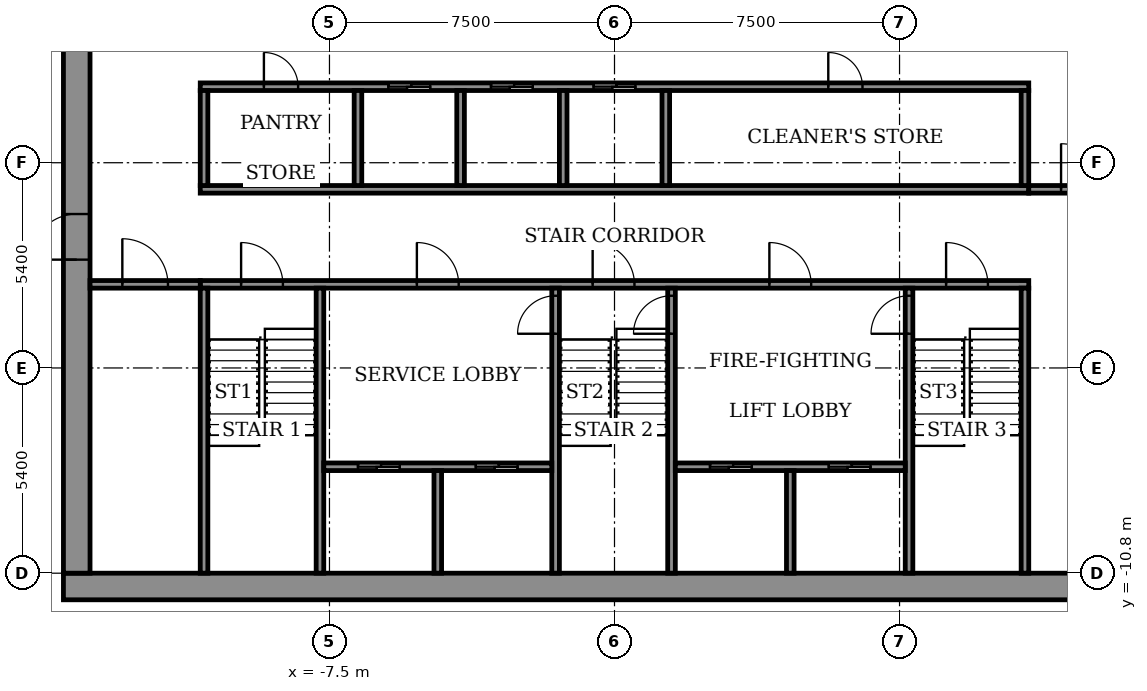
"""IFC4 building model, lengths in metres.
Left out: names, types, materials, properties, quantities, classifications, styles, units other than length and angle.
Written with IfcOpenShell. Run it as: python <this file> out.ifc"""

import sys

from ifc_helpers import new_model, si_unit, direction, frame, frame_2d, origin, place, context, subcontext, project, spatial, rectangle, extrude, element, fill, save


model = new_model("IFC4")
c1 = context("Model", 3, precision=1e-05, world=origin(), true_north=direction((0.0, 1.0)))
c2 = subcontext(c1, "Body", "Model", "MODEL_VIEW")
j1 = project(units=[si_unit("LENGTHUNIT", "METRE"), si_unit("PLANEANGLEUNIT", "RADIAN")], contexts=[c1])
p1 = place(None, origin())
s1 = spatial("IfcSite", under=j1, at=p1, CompositionType="ELEMENT")
p2 = place(p1, origin())
s2 = spatial("IfcBuilding", under=s1, at=p2, CompositionType="ELEMENT")
p3 = place(p2, frame((0.0, 0.0, 287.1)))
s3 = spatial("IfcBuildingStorey", under=s2, at=p3, CompositionType="ELEMENT", Elevation=287.1)
p4 = place(p3, frame((-14.5, -11.15, 0.0), z_axis=(0.0, 0.0, 1.0), x_axis=(1.0, 0.0, 0.0)))
e1 = element("IfcWall", 1, at=p4, inside=s3, PredefinedType="SHEAR", context=c2, shape_type="SweptSolid", body=[
    extrude(rectangle(XDim=29.0, YDim=0.7, at=frame_2d((14.5, 0.0))), origin(), (0.0, 0.0, 1.0), 3.6),
])
p5 = place(p3, frame((-14.15, -10.8, 0.0), z_axis=(0.0, 0.0, 1.0), x_axis=(0.0, 1.0, 0.0)))
e2 = element("IfcWall", 2, at=p5, inside=s3, PredefinedType="SHEAR", context=c2, shape_type="SweptSolid", body=[
    extrude(rectangle(XDim=21.6, YDim=0.7, at=frame_2d((10.8, 0.0))), origin(), (0.0, 0.0, 1.0), 3.6),
])
p6 = place(p5, frame((8.25, 0.0, 0.0)))
e3 = element("IfcOpeningElement", 3, at=p6, cuts=e2, PredefinedType="OPENING", context=c2, shape_type="SweptSolid", body=[
    extrude(rectangle(XDim=1.2, YDim=2.1, at=frame_2d((0.6, 1.05))), frame((0.0, 0.36, 0.0), z_axis=(0.0, -1.0, 0.0), x_axis=(1.0, 0.0, 0.0)), (0.0, 0.0, 1.0), 0.72),
])
p7 = place(p5, frame((15.25, 0.0, 0.0)))
e4 = element("IfcOpeningElement", 4, at=p7, cuts=e2, PredefinedType="OPENING", context=c2, shape_type="SweptSolid", body=[
    extrude(rectangle(XDim=1.2, YDim=2.1, at=frame_2d((0.6, 1.05))), frame((0.0, 0.36, 0.0), z_axis=(0.0, -1.0, 0.0), x_axis=(1.0, 0.0, 0.0)), (0.0, 0.0, 1.0), 0.72),
])
p8 = place(p3, frame((-10.9, -3.2, 0.0), z_axis=(0.0, 0.0, 1.0), x_axis=(1.0, 0.0, 0.0)))
e5 = element("IfcWall", 5, at=p8, inside=s3, PredefinedType="SHEAR", context=c2, shape_type="SweptSolid", body=[
    extrude(rectangle(XDim=21.8, YDim=0.2, at=frame_2d((10.9, 0.0))), origin(), (0.0, 0.0, 1.0), 3.05),
])
p9 = place(p8, frame((1.075, 0.0, 0.0)))
e6 = element("IfcOpeningElement", 6, at=p9, cuts=e5, PredefinedType="OPENING", context=c2, shape_type="SweptSolid", body=[
    extrude(rectangle(XDim=1.1, YDim=2.1, at=frame_2d((0.55, 1.05))), frame((0.0, 0.11, 0.0), z_axis=(0.0, -1.0, 0.0), x_axis=(1.0, 0.0, 0.0)), (0.0, 0.0, 1.0), 0.22),
])
p10 = place(p8, frame((10.325, 0.0, 0.0)))
e7 = element("IfcOpeningElement", 7, at=p10, cuts=e5, PredefinedType="OPENING", context=c2, shape_type="SweptSolid", body=[
    extrude(rectangle(XDim=1.1, YDim=2.1, at=frame_2d((0.55, 1.05))), frame((0.0, 0.11, 0.0), z_axis=(0.0, -1.0, 0.0), x_axis=(1.0, 0.0, 0.0)), (0.0, 0.0, 1.0), 0.22),
])
p11 = place(p8, frame((19.625, 0.0, 0.0)))
e8 = element("IfcOpeningElement", 8, at=p11, cuts=e5, PredefinedType="OPENING", context=c2, shape_type="SweptSolid", body=[
    extrude(rectangle(XDim=1.1, YDim=2.1, at=frame_2d((0.55, 1.05))), frame((0.0, 0.11, 0.0), z_axis=(0.0, -1.0, 0.0), x_axis=(1.0, 0.0, 0.0)), (0.0, 0.0, 1.0), 0.22),
])
p12 = place(p8, frame((5.7, 0.0, 0.0)))
e9 = element("IfcOpeningElement", 9, at=p12, cuts=e5, PredefinedType="OPENING", context=c2, shape_type="SweptSolid", body=[
    extrude(rectangle(XDim=1.1, YDim=2.1, at=frame_2d((0.55, 1.05))), frame((0.0, 0.11, 0.0), z_axis=(0.0, -1.0, 0.0), x_axis=(1.0, 0.0, 0.0)), (0.0, 0.0, 1.0), 0.22),
])
p13 = place(p8, frame((14.975, 0.0, 0.0)))
e10 = element("IfcOpeningElement", 10, at=p13, cuts=e5, PredefinedType="OPENING", context=c2, shape_type="SweptSolid", body=[
    extrude(rectangle(XDim=1.1, YDim=2.1, at=frame_2d((0.55, 1.05))), frame((0.0, 0.11, 0.0), z_axis=(0.0, -1.0, 0.0), x_axis=(1.0, 0.0, 0.0)), (0.0, 0.0, 1.0), 0.22),
])
p14 = place(p3, frame((-10.9, -0.7, 0.0), z_axis=(0.0, 0.0, 1.0), x_axis=(1.0, 0.0, 0.0)))
e11 = element("IfcWall", 11, at=p14, inside=s3, PredefinedType="SHEAR", context=c2, shape_type="SweptSolid", body=[
    extrude(rectangle(XDim=21.8, YDim=0.2, at=frame_2d((10.9, 0.0))), origin(), (0.0, 0.0, 1.0), 3.05),
])
p15 = place(p3, frame((-10.9, 2.0, 0.0), z_axis=(0.0, 0.0, 1.0), x_axis=(1.0, 0.0, 0.0)))
e12 = element("IfcWall", 12, at=p15, inside=s3, PredefinedType="SHEAR", context=c2, shape_type="SweptSolid", body=[
    extrude(rectangle(XDim=21.8, YDim=0.2, at=frame_2d((10.9, 0.0))), origin(), (0.0, 0.0, 1.0), 3.05),
])
p16 = place(p15, frame((4.95, 0.0, 0.0)))
e13 = element("IfcOpeningElement", 13, at=p16, cuts=e12, PredefinedType="OPENING", context=c2, shape_type="SweptSolid", body=[
    extrude(rectangle(XDim=1.1, YDim=2.1, at=frame_2d((0.55, 1.05))), frame((0.0, 0.11, 0.0), z_axis=(0.0, -1.0, 0.0), x_axis=(1.0, 0.0, 0.0)), (0.0, 0.0, 1.0), 0.22),
])
p17 = place(p15, frame((7.65, 0.0, 0.0)))
e14 = element("IfcOpeningElement", 14, at=p17, cuts=e12, PredefinedType="OPENING", context=c2, shape_type="SweptSolid", body=[
    extrude(rectangle(XDim=1.1, YDim=2.1, at=frame_2d((0.55, 1.05))), frame((0.0, 0.11, 0.0), z_axis=(0.0, -1.0, 0.0), x_axis=(1.0, 0.0, 0.0)), (0.0, 0.0, 1.0), 0.22),
])
p18 = place(p15, frame((10.35, 0.0, 0.0)))
e15 = element("IfcOpeningElement", 15, at=p18, cuts=e12, PredefinedType="OPENING", context=c2, shape_type="SweptSolid", body=[
    extrude(rectangle(XDim=1.1, YDim=2.1, at=frame_2d((0.55, 1.05))), frame((0.0, 0.11, 0.0), z_axis=(0.0, -1.0, 0.0), x_axis=(1.0, 0.0, 0.0)), (0.0, 0.0, 1.0), 0.22),
])
p19 = place(p15, frame((1.675, 0.0, 0.0)))
e16 = element("IfcOpeningElement", 16, at=p19, cuts=e12, PredefinedType="OPENING", context=c2, shape_type="SweptSolid", body=[
    extrude(rectangle(XDim=0.9, YDim=2.1, at=frame_2d((0.45, 1.05))), frame((0.0, 0.11, 0.0), z_axis=(0.0, -1.0, 0.0), x_axis=(1.0, 0.0, 0.0)), (0.0, 0.0, 1.0), 0.22),
])
p20 = place(p15, frame((16.525, 0.0, 0.0)))
e17 = element("IfcOpeningElement", 17, at=p20, cuts=e12, PredefinedType="OPENING", context=c2, shape_type="SweptSolid", body=[
    extrude(rectangle(XDim=0.9, YDim=2.1, at=frame_2d((0.45, 1.05))), frame((0.0, 0.11, 0.0), z_axis=(0.0, -1.0, 0.0), x_axis=(1.0, 0.0, 0.0)), (0.0, 0.0, 1.0), 0.22),
])
for number, where, z_axis, x_axis in (
    (18, (-10.8, -10.8, 0.0), (0.0, 0.0, 1.0), (0.0, 1.0, 0.0)),
    (19, (-7.75, -10.8, 0.0), (0.0, 0.0, 1.0), (0.0, 1.0, 0.0)),
):
    element("IfcWall", number, at=place(p3, frame(where, z_axis=z_axis, x_axis=x_axis)), inside=s3, PredefinedType="SHEAR", context=c2, shape_type="SweptSolid", body=[
        extrude(rectangle(XDim=7.5, YDim=0.2, at=frame_2d((3.75, 0.0))), origin(), (0.0, 0.0, 1.0), 3.05),
    ])
p21 = place(p3, frame((-1.55, -10.8, 0.0), z_axis=(0.0, 0.0, 1.0), x_axis=(0.0, 1.0, 0.0)))
e20 = element("IfcWall", 20, at=p21, inside=s3, PredefinedType="SHEAR", context=c2, shape_type="SweptSolid", body=[
    extrude(rectangle(XDim=7.5, YDim=0.2, at=frame_2d((3.75, 0.0))), origin(), (0.0, 0.0, 1.0), 3.05),
])
p22 = place(p21, frame((6.3, 0.0, 0.0)))
e21 = element("IfcOpeningElement", 21, at=p22, cuts=e20, PredefinedType="OPENING", context=c2, shape_type="SweptSolid", body=[
    extrude(rectangle(XDim=1.0, YDim=2.1, at=frame_2d((0.5, 1.05))), frame((0.0, 0.11, 0.0), z_axis=(0.0, -1.0, 0.0), x_axis=(1.0, 0.0, 0.0)), (0.0, 0.0, 1.0), 0.22),
])
p23 = place(p3, frame((1.5, -10.8, 0.0), z_axis=(0.0, 0.0, 1.0), x_axis=(0.0, 1.0, 0.0)))
e22 = element("IfcWall", 22, at=p23, inside=s3, PredefinedType="SHEAR", context=c2, shape_type="SweptSolid", body=[
    extrude(rectangle(XDim=7.5, YDim=0.2, at=frame_2d((3.75, 0.0))), origin(), (0.0, 0.0, 1.0), 3.05),
])
p24 = place(p23, frame((6.3, 0.0, 0.0)))
e23 = element("IfcOpeningElement", 23, at=p24, cuts=e22, PredefinedType="OPENING", context=c2, shape_type="SweptSolid", body=[
    extrude(rectangle(XDim=1.0, YDim=2.1, at=frame_2d((0.5, 1.05))), frame((0.0, 0.11, 0.0), z_axis=(0.0, -1.0, 0.0), x_axis=(1.0, 0.0, 0.0)), (0.0, 0.0, 1.0), 0.22),
])
p25 = place(p3, frame((7.75, -10.8, 0.0), z_axis=(0.0, 0.0, 1.0), x_axis=(0.0, 1.0, 0.0)))
e24 = element("IfcWall", 24, at=p25, inside=s3, PredefinedType="SHEAR", context=c2, shape_type="SweptSolid", body=[
    extrude(rectangle(XDim=7.5, YDim=0.2, at=frame_2d((3.75, 0.0))), origin(), (0.0, 0.0, 1.0), 3.05),
])
p26 = place(p25, frame((6.3, 0.0, 0.0)))
e25 = element("IfcOpeningElement", 25, at=p26, cuts=e24, PredefinedType="OPENING", context=c2, shape_type="SweptSolid", body=[
    extrude(rectangle(XDim=1.0, YDim=2.1, at=frame_2d((0.5, 1.05))), frame((0.0, 0.11, 0.0), z_axis=(0.0, -1.0, 0.0), x_axis=(1.0, 0.0, 0.0)), (0.0, 0.0, 1.0), 0.22),
])
p27 = place(p3, frame((10.8, -10.8, 0.0), z_axis=(0.0, 0.0, 1.0), x_axis=(0.0, 1.0, 0.0)))
e26 = element("IfcWall", 26, at=p27, inside=s3, PredefinedType="SHEAR", context=c2, shape_type="SweptSolid", body=[
    extrude(rectangle(XDim=7.5, YDim=0.2, at=frame_2d((3.75, 0.0))), origin(), (0.0, 0.0, 1.0), 3.05),
])
p28 = place(p3, frame((-7.65, -8.0, 0.0), z_axis=(0.0, 0.0, 1.0), x_axis=(1.0, 0.0, 0.0)))
e27 = element("IfcWall", 27, at=p28, inside=s3, PredefinedType="SHEAR", context=c2, shape_type="SweptSolid", body=[
    extrude(rectangle(XDim=6.0, YDim=0.2, at=frame_2d((3.0, 0.0))), origin(), (0.0, 0.0, 1.0), 3.05),
])
p29 = place(p28, frame((0.9, 0.0, 0.0)))
e28 = element("IfcOpeningElement", 28, at=p29, cuts=e27, PredefinedType="OPENING", context=c2, shape_type="SweptSolid", body=[
    extrude(rectangle(XDim=1.1, YDim=2.1, at=frame_2d((0.55, 1.05))), frame((0.0, 0.11, 0.0), z_axis=(0.0, -1.0, 0.0), x_axis=(1.0, 0.0, 0.0)), (0.0, 0.0, 1.0), 0.22),
])
p30 = place(p28, frame((4.0, 0.0, 0.0)))
e29 = element("IfcOpeningElement", 29, at=p30, cuts=e27, PredefinedType="OPENING", context=c2, shape_type="SweptSolid", body=[
    extrude(rectangle(XDim=1.1, YDim=2.1, at=frame_2d((0.55, 1.05))), frame((0.0, 0.11, 0.0), z_axis=(0.0, -1.0, 0.0), x_axis=(1.0, 0.0, 0.0)), (0.0, 0.0, 1.0), 0.22),
])
p31 = place(p3, frame((-4.65, -10.8, 0.0), z_axis=(0.0, 0.0, 1.0), x_axis=(0.0, 1.0, 0.0)))
e30 = element("IfcWall", 30, at=p31, inside=s3, PredefinedType="SHEAR", context=c2, shape_type="SweptSolid", body=[
    extrude(rectangle(XDim=2.7, YDim=0.2, at=frame_2d((1.35, 0.0))), origin(), (0.0, 0.0, 1.0), 3.05),
])
p32 = place(p3, frame((1.6, -8.0, 0.0), z_axis=(0.0, 0.0, 1.0), x_axis=(1.0, 0.0, 0.0)))
e31 = element("IfcWall", 31, at=p32, inside=s3, PredefinedType="SHEAR", context=c2, shape_type="SweptSolid", body=[
    extrude(rectangle(XDim=6.05, YDim=0.2, at=frame_2d((3.025, 0.0))), origin(), (0.0, 0.0, 1.0), 3.05),
])
p33 = place(p32, frame((0.913, 0.0, 0.0)))
e32 = element("IfcOpeningElement", 32, at=p33, cuts=e31, PredefinedType="OPENING", context=c2, shape_type="SweptSolid", body=[
    extrude(rectangle(XDim=1.1, YDim=2.1, at=frame_2d((0.55, 1.05))), frame((0.0, 0.11, 0.0), z_axis=(0.0, -1.0, 0.0), x_axis=(1.0, 0.0, 0.0)), (0.0, 0.0, 1.0), 0.22),
])
p34 = place(p32, frame((4.038, 0.0, 0.0)))
e33 = element("IfcOpeningElement", 33, at=p34, cuts=e31, PredefinedType="OPENING", context=c2, shape_type="SweptSolid", body=[
    extrude(rectangle(XDim=1.1, YDim=2.1, at=frame_2d((0.55, 1.05))), frame((0.0, 0.11, 0.0), z_axis=(0.0, -1.0, 0.0), x_axis=(1.0, 0.0, 0.0)), (0.0, 0.0, 1.0), 0.22),
])
p35 = place(p3, frame((4.625, -10.8, 0.0), z_axis=(0.0, 0.0, 1.0), x_axis=(0.0, 1.0, 0.0)))
e34 = element("IfcWall", 34, at=p35, inside=s3, PredefinedType="SHEAR", context=c2, shape_type="SweptSolid", body=[
    extrude(rectangle(XDim=2.7, YDim=0.2, at=frame_2d((1.35, 0.0))), origin(), (0.0, 0.0, 1.0), 3.05),
])
p36 = place(p3, frame((-10.8, -0.6, 0.0), z_axis=(0.0, 0.0, 1.0), x_axis=(0.0, 1.0, 0.0)))
e35 = element("IfcWall", 35, at=p36, inside=s3, PredefinedType="STANDARD", context=c2, shape_type="SweptSolid", body=[
    extrude(rectangle(XDim=2.5, YDim=0.2, at=frame_2d((1.25, 0.0))), origin(), (0.0, 0.0, 1.0), 3.05),
])
for number, where, z_axis, x_axis in (
    (36, (-6.75, -0.6, 0.0), (0.0, 0.0, 1.0), (0.0, 1.0, 0.0)),
    (37, (-4.05, -0.6, 0.0), (0.0, 0.0, 1.0), (0.0, 1.0, 0.0)),
    (38, (-1.35, -0.6, 0.0), (0.0, 0.0, 1.0), (0.0, 1.0, 0.0)),
    (39, (1.35, -0.6, 0.0), (0.0, 0.0, 1.0), (0.0, 1.0, 0.0)),
):
    element("IfcWall", number, at=place(p3, frame(where, z_axis=z_axis, x_axis=x_axis)), inside=s3, PredefinedType="SHEAR", context=c2, shape_type="SweptSolid", body=[
        extrude(rectangle(XDim=2.5, YDim=0.2, at=frame_2d((1.25, 0.0))), origin(), (0.0, 0.0, 1.0), 3.05),
    ])
p37 = place(p3, frame((10.8, -0.6, 0.0), z_axis=(0.0, 0.0, 1.0), x_axis=(0.0, 1.0, 0.0)))
e40 = element("IfcWall", 40, at=p37, inside=s3, PredefinedType="STANDARD", context=c2, shape_type="SweptSolid", body=[
    extrude(rectangle(XDim=2.5, YDim=0.2, at=frame_2d((1.25, 0.0))), origin(), (0.0, 0.0, 1.0), 3.05),
])
p38 = place(p3, frame((-13.8, -3.2, 0.0), z_axis=(0.0, 0.0, 1.0), x_axis=(1.0, 0.0, 0.0)))
e41 = element("IfcWall", 41, at=p38, inside=s3, PredefinedType="STANDARD", context=c2, shape_type="SweptSolid", body=[
    extrude(rectangle(XDim=2.9, YDim=0.2, at=frame_2d((1.45, 0.0))), origin(), (0.0, 0.0, 1.0), 3.05),
])
p39 = place(p38, frame((0.85, 0.0, 0.0)))
e42 = element("IfcOpeningElement", 42, at=p39, cuts=e41, PredefinedType="OPENING", context=c2, shape_type="SweptSolid", body=[
    extrude(rectangle(XDim=1.2, YDim=2.1, at=frame_2d((0.6, 1.05))), frame((0.0, 0.11, 0.0), z_axis=(0.0, -1.0, 0.0), x_axis=(1.0, 0.0, 0.0)), (0.0, 0.0, 1.0), 0.22),
])
p40 = place(p3, frame((10.9, -0.7, 0.0), z_axis=(0.0, 0.0, 1.0), x_axis=(1.0, 0.0, 0.0)))
e43 = element("IfcWall", 43, at=p40, inside=s3, PredefinedType="STANDARD", context=c2, shape_type="SweptSolid", body=[
    extrude(rectangle(XDim=2.9, YDim=0.2, at=frame_2d((1.45, 0.0))), origin(), (0.0, 0.0, 1.0), 3.05),
])
p41 = place(p40, frame((0.85, 0.0, 0.0)))
e44 = element("IfcOpeningElement", 44, at=p41, cuts=e43, PredefinedType="OPENING", context=c2, shape_type="SweptSolid", body=[
    extrude(rectangle(XDim=1.2, YDim=2.1, at=frame_2d((0.6, 1.05))), frame((0.0, 0.11, 0.0), z_axis=(0.0, -1.0, 0.0), x_axis=(1.0, 0.0, 0.0)), (0.0, 0.0, 1.0), 0.22),
])
p42 = place(p6, origin())
e45 = element("IfcDoor", 45, at=p42, inside=s3, OperationType="DOUBLE_DOOR_SINGLE_SWING", PredefinedType="DOOR", context=c2, shape_type="SweptSolid", body=[
    extrude(rectangle(XDim=1.2, YDim=2.1, at=frame_2d((0.6, 1.05))), frame((0.0, 0.025, 0.0), z_axis=(0.0, -1.0, 0.0), x_axis=(1.0, 0.0, 0.0)), (0.0, 0.0, 1.0), 0.05),
])
fill(e3, e45)
p43 = place(p16, origin())
e46 = element("IfcDoor", 46, at=p43, inside=s3, OperationType="SLIDING_TO_LEFT", PredefinedType="DOOR", context=c2, shape_type="SweptSolid", body=[
    extrude(rectangle(XDim=1.1, YDim=2.1, at=frame_2d((0.55, 1.05))), frame((0.0, 0.025, 0.0), z_axis=(0.0, -1.0, 0.0), x_axis=(1.0, 0.0, 0.0)), (0.0, 0.0, 1.0), 0.05),
])
fill(e13, e46)
p44 = place(p17, origin())
e47 = element("IfcDoor", 47, at=p44, inside=s3, OperationType="SLIDING_TO_LEFT", PredefinedType="DOOR", context=c2, shape_type="SweptSolid", body=[
    extrude(rectangle(XDim=1.1, YDim=2.1, at=frame_2d((0.55, 1.05))), frame((0.0, 0.025, 0.0), z_axis=(0.0, -1.0, 0.0), x_axis=(1.0, 0.0, 0.0)), (0.0, 0.0, 1.0), 0.05),
])
fill(e14, e47)
p45 = place(p18, origin())
e48 = element("IfcDoor", 48, at=p45, inside=s3, OperationType="SLIDING_TO_LEFT", PredefinedType="DOOR", context=c2, shape_type="SweptSolid", body=[
    extrude(rectangle(XDim=1.1, YDim=2.1, at=frame_2d((0.55, 1.05))), frame((0.0, 0.025, 0.0), z_axis=(0.0, -1.0, 0.0), x_axis=(1.0, 0.0, 0.0)), (0.0, 0.0, 1.0), 0.05),
])
fill(e15, e48)
p46 = place(p19, origin())
e49 = element("IfcDoor", 49, at=p46, inside=s3, OperationType="SINGLE_SWING_RIGHT", PredefinedType="DOOR", context=c2, shape_type="SweptSolid", body=[
    extrude(rectangle(XDim=0.9, YDim=2.1, at=frame_2d((0.45, 1.05))), frame((0.0, 0.025, 0.0), z_axis=(0.0, -1.0, 0.0), x_axis=(1.0, 0.0, 0.0)), (0.0, 0.0, 1.0), 0.05),
])
fill(e16, e49)
p47 = place(p20, origin())
e50 = element("IfcDoor", 50, at=p47, inside=s3, OperationType="SINGLE_SWING_RIGHT", PredefinedType="DOOR", context=c2, shape_type="SweptSolid", body=[
    extrude(rectangle(XDim=0.9, YDim=2.1, at=frame_2d((0.45, 1.05))), frame((0.0, 0.025, 0.0), z_axis=(0.0, -1.0, 0.0), x_axis=(1.0, 0.0, 0.0)), (0.0, 0.0, 1.0), 0.05),
])
fill(e17, e50)
p48 = place(p33, origin())
e51 = element("IfcDoor", 51, at=p48, inside=s3, OperationType="SLIDING_TO_LEFT", PredefinedType="DOOR", context=c2, shape_type="SweptSolid", body=[
    extrude(rectangle(XDim=1.1, YDim=2.1, at=frame_2d((0.55, 1.05))), frame((0.0, 0.025, 0.0), z_axis=(0.0, -1.0, 0.0), x_axis=(1.0, 0.0, 0.0)), (0.0, 0.0, 1.0), 0.05),
])
fill(e32, e51)
p49 = place(p29, origin())
e52 = element("IfcDoor", 52, at=p49, inside=s3, OperationType="SLIDING_TO_LEFT", PredefinedType="DOOR", context=c2, shape_type="SweptSolid", body=[
    extrude(rectangle(XDim=1.1, YDim=2.1, at=frame_2d((0.55, 1.05))), frame((0.0, 0.025, 0.0), z_axis=(0.0, -1.0, 0.0), x_axis=(1.0, 0.0, 0.0)), (0.0, 0.0, 1.0), 0.05),
])
fill(e28, e52)
p50 = place(p34, origin())
e53 = element("IfcDoor", 53, at=p50, inside=s3, OperationType="SLIDING_TO_LEFT", PredefinedType="DOOR", context=c2, shape_type="SweptSolid", body=[
    extrude(rectangle(XDim=1.1, YDim=2.1, at=frame_2d((0.55, 1.05))), frame((0.0, 0.025, 0.0), z_axis=(0.0, -1.0, 0.0), x_axis=(1.0, 0.0, 0.0)), (0.0, 0.0, 1.0), 0.05),
])
fill(e33, e53)
p51 = place(p30, origin())
e54 = element("IfcDoor", 54, at=p51, inside=s3, OperationType="SLIDING_TO_LEFT", PredefinedType="DOOR", context=c2, shape_type="SweptSolid", body=[
    extrude(rectangle(XDim=1.1, YDim=2.1, at=frame_2d((0.55, 1.05))), frame((0.0, 0.025, 0.0), z_axis=(0.0, -1.0, 0.0), x_axis=(1.0, 0.0, 0.0)), (0.0, 0.0, 1.0), 0.05),
])
fill(e29, e54)
p52 = place(p9, origin())
e55 = element("IfcDoor", 55, at=p52, inside=s3, OperationType="SINGLE_SWING_RIGHT", PredefinedType="DOOR", context=c2, shape_type="SweptSolid", body=[
    extrude(rectangle(XDim=1.1, YDim=2.1, at=frame_2d((0.55, 1.05))), frame((0.0, 0.025, 0.0), z_axis=(0.0, -1.0, 0.0), x_axis=(1.0, 0.0, 0.0)), (0.0, 0.0, 1.0), 0.05),
])
fill(e6, e55)
p53 = place(p10, origin())
e56 = element("IfcDoor", 56, at=p53, inside=s3, OperationType="SINGLE_SWING_RIGHT", PredefinedType="DOOR", context=c2, shape_type="SweptSolid", body=[
    extrude(rectangle(XDim=1.1, YDim=2.1, at=frame_2d((0.55, 1.05))), frame((0.0, 0.025, 0.0), z_axis=(0.0, -1.0, 0.0), x_axis=(1.0, 0.0, 0.0)), (0.0, 0.0, 1.0), 0.05),
])
fill(e7, e56)
p54 = place(p11, origin())
e57 = element("IfcDoor", 57, at=p54, inside=s3, OperationType="SINGLE_SWING_RIGHT", PredefinedType="DOOR", context=c2, shape_type="SweptSolid", body=[
    extrude(rectangle(XDim=1.1, YDim=2.1, at=frame_2d((0.55, 1.05))), frame((0.0, 0.025, 0.0), z_axis=(0.0, -1.0, 0.0), x_axis=(1.0, 0.0, 0.0)), (0.0, 0.0, 1.0), 0.05),
])
fill(e8, e57)
p55 = place(p12, origin())
e58 = element("IfcDoor", 58, at=p55, inside=s3, OperationType="SINGLE_SWING_LEFT", PredefinedType="DOOR", context=c2, shape_type="SweptSolid", body=[
    extrude(rectangle(XDim=1.1, YDim=2.1, at=frame_2d((0.55, 1.05))), frame((0.0, 0.025, 0.0), z_axis=(0.0, -1.0, 0.0), x_axis=(1.0, 0.0, 0.0)), (0.0, 0.0, 1.0), 0.05),
])
fill(e9, e58)
p56 = place(p13, origin())
e59 = element("IfcDoor", 59, at=p56, inside=s3, OperationType="SINGLE_SWING_LEFT", PredefinedType="DOOR", context=c2, shape_type="SweptSolid", body=[
    extrude(rectangle(XDim=1.1, YDim=2.1, at=frame_2d((0.55, 1.05))), frame((0.0, 0.025, 0.0), z_axis=(0.0, -1.0, 0.0), x_axis=(1.0, 0.0, 0.0)), (0.0, 0.0, 1.0), 0.05),
])
fill(e10, e59)
p57 = place(p22, origin())
e60 = element("IfcDoor", 60, at=p57, inside=s3, OperationType="SINGLE_SWING_RIGHT", PredefinedType="DOOR", context=c2, shape_type="SweptSolid", body=[
    extrude(rectangle(XDim=1.0, YDim=2.1, at=frame_2d((0.5, 1.05))), frame((0.0, 0.025, 0.0), z_axis=(0.0, -1.0, 0.0), x_axis=(1.0, 0.0, 0.0)), (0.0, 0.0, 1.0), 0.05),
])
fill(e21, e60)
p58 = place(p24, origin())
e61 = element("IfcDoor", 61, at=p58, inside=s3, OperationType="SINGLE_SWING_RIGHT", PredefinedType="DOOR", context=c2, shape_type="SweptSolid", body=[
    extrude(rectangle(XDim=1.0, YDim=2.1, at=frame_2d((0.5, 1.05))), frame((0.0, 0.025, 0.0), z_axis=(0.0, -1.0, 0.0), x_axis=(1.0, 0.0, 0.0)), (0.0, 0.0, 1.0), 0.05),
])
fill(e23, e61)
p59 = place(p26, origin())
e62 = element("IfcDoor", 62, at=p59, inside=s3, OperationType="SINGLE_SWING_RIGHT", PredefinedType="DOOR", context=c2, shape_type="SweptSolid", body=[
    extrude(rectangle(XDim=1.0, YDim=2.1, at=frame_2d((0.5, 1.05))), frame((0.0, 0.025, 0.0), z_axis=(0.0, -1.0, 0.0), x_axis=(1.0, 0.0, 0.0)), (0.0, 0.0, 1.0), 0.05),
])
fill(e25, e62)
p60 = place(p39, origin())
e63 = element("IfcDoor", 63, at=p60, inside=s3, OperationType="SINGLE_SWING_LEFT", PredefinedType="DOOR", context=c2, shape_type="SweptSolid", body=[
    extrude(rectangle(XDim=1.2, YDim=2.1, at=frame_2d((0.6, 1.05))), frame((0.0, 0.025, 0.0), z_axis=(0.0, -1.0, 0.0), x_axis=(1.0, 0.0, 0.0)), (0.0, 0.0, 1.0), 0.05),
])
fill(e42, e63)
p61 = place(p41, origin())
e64 = element("IfcDoor", 64, at=p61, inside=s3, OperationType="SINGLE_SWING_LEFT", PredefinedType="DOOR", context=c2, shape_type="SweptSolid", body=[
    extrude(rectangle(XDim=1.2, YDim=2.1, at=frame_2d((0.6, 1.05))), frame((0.0, 0.025, 0.0), z_axis=(0.0, -1.0, 0.0), x_axis=(1.0, 0.0, 0.0)), (0.0, 0.0, 1.0), 0.05),
])
fill(e44, e64)
save(model, sys.argv[1])
